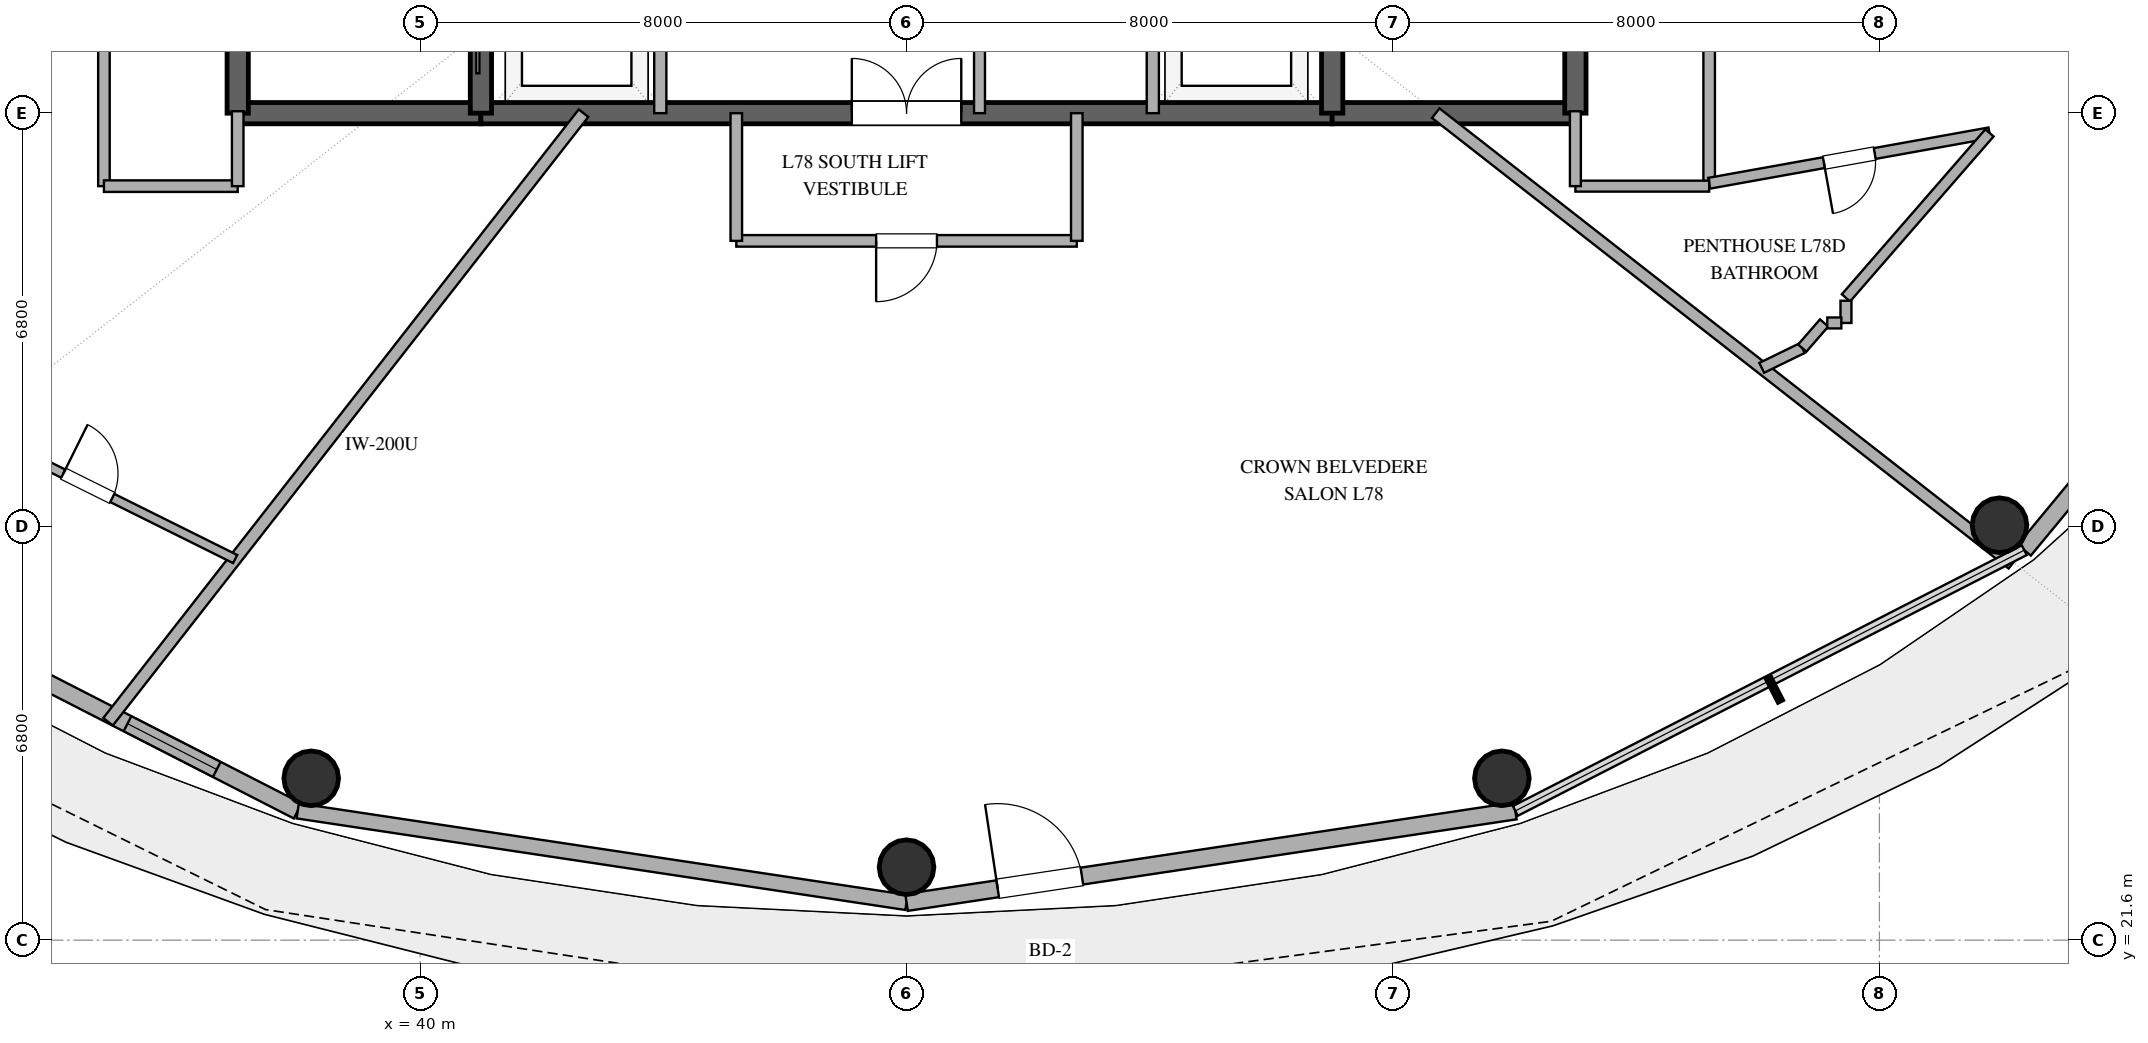
"""IFC4 building model, lengths in metres.
Left out: names, types, materials, properties, quantities, classifications, styles, units other than length and angle.
Written with IfcOpenShell. Run it as: python <this file> out.ifc"""

import sys

from ifc_helpers import new_model, si_unit, direction, frame, frame_2d, origin, origin_2d, place, context, subcontext, project, spatial, rectangle, hollow_circle, extrude, element, fill, save


model = new_model("IFC4")
c1 = context("Model", 3, precision=1e-05, world=origin(), true_north=direction((0.0, 1.0)))
c2 = subcontext(c1, "Body", "Model", "MODEL_VIEW")
j1 = project(units=[si_unit("LENGTHUNIT", "METRE"), si_unit("PLANEANGLEUNIT", "RADIAN")], contexts=[c1])
p1 = place(None, origin())
s1 = spatial("IfcSite", under=j1, at=p1, CompositionType="ELEMENT")
p2 = place(p1, origin())
s2 = spatial("IfcBuilding", under=s1, at=p2, CompositionType="ELEMENT")
p3 = place(p2, frame((0.0, 0.0, 301.8)))
s3 = spatial("IfcBuildingStorey", under=s2, at=p3, CompositionType="ELEMENT", Elevation=301.8)
p4 = place(p3, frame((37.0, 35.2, 0.0), z_axis=(0.0, 0.0, 1.0), x_axis=(1.0, 0.0, 0.0)))
e1 = element("IfcWall", 1, at=p4, inside=s3, PredefinedType="SHEAR", context=c2, shape_type="SweptSolid", body=[
    extrude(rectangle(XDim=4.0, YDim=0.35, at=frame_2d((2.0, 0.0))), origin(), (0.0, 0.0, 1.0), 3.37),
])
p5 = place(p3, frame((41.0, 35.2, 0.0), z_axis=(0.0, 0.0, 1.0), x_axis=(1.0, 0.0, 0.0)))
e2 = element("IfcWall", 2, at=p5, inside=s3, PredefinedType="SHEAR", context=c2, shape_type="SweptSolid", body=[
    extrude(rectangle(XDim=14.0, YDim=0.35, at=frame_2d((7.0, 0.0))), origin(), (0.0, 0.0, 1.0), 3.37),
])
p6 = place(p5, frame((6.1, 0.0, 0.0)))
e3 = element("IfcOpeningElement", 3, at=p6, cuts=e2, PredefinedType="OPENING", context=c2, shape_type="SweptSolid", body=[
    extrude(rectangle(XDim=1.8, YDim=2.25, at=frame_2d((0.9, 1.125))), frame((0.0, 0.185, 0.0), z_axis=(0.0, -1.0, 0.0), x_axis=(1.0, 0.0, 0.0)), (0.0, 0.0, 1.0), 0.37),
])
p7 = place(p3, frame((55.0, 35.2, 0.0), z_axis=(0.0, 0.0, 1.0), x_axis=(1.0, 0.0, 0.0)))
e4 = element("IfcWall", 4, at=p7, inside=s3, PredefinedType="SHEAR", context=c2, shape_type="SweptSolid", body=[
    extrude(rectangle(XDim=4.0, YDim=0.35, at=frame_2d((2.0, 0.0))), origin(), (0.0, 0.0, 1.0), 3.37),
])
p8 = place(p3, frame((37.0, 35.2, 0.0), z_axis=(0.0, 0.0, 1.0), x_axis=(0.0, 1.0, 0.0)))
e5 = element("IfcWall", 5, at=p8, inside=s3, PredefinedType="SHEAR", context=c2, shape_type="SweptSolid", body=[
    extrude(rectangle(XDim=13.6, YDim=0.35, at=frame_2d((6.8, 0.0))), origin(), (0.0, 0.0, 1.0), 3.37),
])
p9 = place(p8, frame((1.5, 0.0, 0.0)))
e6 = element("IfcOpeningElement", 6, at=p9, cuts=e5, PredefinedType="OPENING", context=c2, shape_type="SweptSolid", body=[
    extrude(rectangle(XDim=1.2, YDim=2.15, at=frame_2d((0.6, 1.075))), frame((0.0, 0.185, 0.0), z_axis=(0.0, -1.0, 0.0), x_axis=(1.0, 0.0, 0.0)), (0.0, 0.0, 1.0), 0.37),
])
p10 = place(p3, frame((59.0, 35.2, 0.0), z_axis=(0.0, 0.0, 1.0), x_axis=(0.0, 1.0, 0.0)))
e7 = element("IfcWall", 7, at=p10, inside=s3, PredefinedType="SHEAR", context=c2, shape_type="SweptSolid", body=[
    extrude(rectangle(XDim=13.6, YDim=0.35, at=frame_2d((6.8, 0.0))), origin(), (0.0, 0.0, 1.0), 3.37),
])
p11 = place(p10, frame((1.5, 0.0, 0.0)))
e8 = element("IfcOpeningElement", 8, at=p11, cuts=e7, PredefinedType="OPENING", context=c2, shape_type="SweptSolid", body=[
    extrude(rectangle(XDim=1.2, YDim=2.15, at=frame_2d((0.6, 1.075))), frame((0.0, 0.185, 0.0), z_axis=(0.0, -1.0, 0.0), x_axis=(1.0, 0.0, 0.0)), (0.0, 0.0, 1.0), 0.37),
])
p12 = place(p3, frame((41.0, 35.2, 0.0), z_axis=(0.0, 0.0, 1.0), x_axis=(0.0, 1.0, 0.0)))
e9 = element("IfcWall", 9, at=p12, inside=s3, PredefinedType="SHEAR", context=c2, shape_type="SweptSolid", body=[
    extrude(rectangle(XDim=13.6, YDim=0.35, at=frame_2d((6.8, 0.0))), origin(), (0.0, 0.0, 1.0), 3.37),
])
p13 = place(p12, frame((1.15, 0.0, 0.0)))
e10 = element("IfcOpeningElement", 10, at=p13, cuts=e9, PredefinedType="OPENING", context=c2, shape_type="SweptSolid", body=[
    extrude(rectangle(XDim=1.1, YDim=2.2, at=frame_2d((0.55, 1.1))), frame((0.0, 0.185, 0.0), z_axis=(0.0, -1.0, 0.0), x_axis=(1.0, 0.0, 0.0)), (0.0, 0.0, 1.0), 0.37),
])
p14 = place(p3, frame((55.0, 35.2, 0.0), z_axis=(0.0, 0.0, 1.0), x_axis=(0.0, 1.0, 0.0)))
e11 = element("IfcWall", 11, at=p14, inside=s3, PredefinedType="SHEAR", context=c2, shape_type="SweptSolid", body=[
    extrude(rectangle(XDim=13.6, YDim=0.35, at=frame_2d((6.8, 0.0))), origin(), (0.0, 0.0, 1.0), 3.37),
])
p15 = place(p14, frame((1.15, 0.0, 0.0)))
e12 = element("IfcOpeningElement", 12, at=p15, cuts=e11, PredefinedType="OPENING", context=c2, shape_type="SweptSolid", body=[
    extrude(rectangle(XDim=1.1, YDim=2.2, at=frame_2d((0.55, 1.1))), frame((0.0, 0.185, 0.0), z_axis=(0.0, -1.0, 0.0), x_axis=(1.0, 0.0, 0.0)), (0.0, 0.0, 1.0), 0.37),
])
for number, where, z_axis, x_axis in (
    (13, (38.209, 24.261, 0.0), (0.0, 0.0, 1.0), (1.0, 0.0, 0.0)),
    (14, (48.0, 22.8, 0.0), (0.0, 0.0, 1.0), (1.0, 0.0, 0.0)),
    (15, (57.791, 24.261, 0.0), (0.0, 0.0, 1.0), (1.0, 0.0, 0.0)),
    (16, (65.975, 28.424, 0.0), (0.0, 0.0, 1.0), (1.0, 0.0, 0.0)),
):
    element("IfcColumn", number, at=place(p3, frame(where, z_axis=z_axis, x_axis=x_axis)), inside=s3, PredefinedType="COLUMN", context=c2, shape_type="SweptSolid", body=[
        extrude(hollow_circle(Radius=0.45, WallThickness=0.025, at=origin_2d()), origin(), (0.0, 0.0, 1.0), 3.37),
    ])
p16 = place(p3, frame((29.617, 28.013, 0.0), z_axis=(0.0, 0.0, 1.0), x_axis=(0.890007394051, -0.455946091699, 0.0)))
e17 = element("IfcWall", 17, at=p16, inside=s3, PredefinedType="SOLIDWALL", context=c2, shape_type="SweptSolid", body=[
    extrude(rectangle(XDim=9.404, YDim=0.28, at=frame_2d((4.702, 0.0))), origin(), (0.0, 0.0, 1.0), 3.37),
])
p17 = place(p16, frame((2.742, 0.0, 0.85)))
e18 = element("IfcOpeningElement", 18, at=p17, cuts=e17, PredefinedType="OPENING", context=c2, shape_type="SweptSolid", body=[
    extrude(rectangle(XDim=1.8, YDim=2.2, at=frame_2d((0.9, 1.1))), frame((0.0, 0.15, 0.0), z_axis=(0.0, -1.0, 0.0), x_axis=(1.0, 0.0, 0.0)), (0.0, 0.0, 1.0), 0.3),
])
p18 = place(p16, frame((6.258, 0.0, 0.85)))
e19 = element("IfcOpeningElement", 19, at=p18, cuts=e17, PredefinedType="OPENING", context=c2, shape_type="SweptSolid", body=[
    extrude(rectangle(XDim=1.65, YDim=2.0, at=frame_2d((0.825, 1.0))), frame((0.0, 0.15, 0.0), z_axis=(0.0, -1.0, 0.0), x_axis=(1.0, 0.0, 0.0)), (0.0, 0.0, 1.0), 0.3),
])
p19 = place(p3, frame((37.987, 23.726, 0.0), z_axis=(0.0, 0.0, 1.0), x_axis=(0.988882522213, -0.148698881169, 0.0)))
e20 = element("IfcWall", 20, at=p19, inside=s3, PredefinedType="SOLIDWALL", context=c2, shape_type="SweptSolid", body=[
    extrude(rectangle(XDim=10.125, YDim=0.25, at=frame_2d((5.062, 0.0))), origin(), (0.0, 0.0, 1.0), 3.37),
])
p20 = place(p3, frame((48.0, 22.22, 0.0), z_axis=(0.0, 0.0, 1.0), x_axis=(0.988882522213, 0.148698881169, 0.0)))
e21 = element("IfcWall", 21, at=p20, inside=s3, PredefinedType="SOLIDWALL", context=c2, shape_type="SweptSolid", body=[
    extrude(rectangle(XDim=10.125, YDim=0.28, at=frame_2d((5.062, 0.0))), origin(), (0.0, 0.0, 1.0), 3.37),
])
p21 = place(p20, frame((1.516, 0.0, 0.0)))
e22 = element("IfcOpeningElement", 22, at=p21, cuts=e21, PredefinedType="OPENING", context=c2, shape_type="SweptSolid", body=[
    extrude(rectangle(XDim=1.4, YDim=2.2, at=frame_2d((0.7, 1.1))), frame((0.0, 0.15, 0.0), z_axis=(0.0, -1.0, 0.0), x_axis=(1.0, 0.0, 0.0)), (0.0, 0.0, 1.0), 0.3),
])
p22 = place(p3, frame((66.383, 28.013, 0.0), z_axis=(0.0, 0.0, 1.0), x_axis=(0.63761509934, 0.770355103243, 0.0)))
e23 = element("IfcWall", 23, at=p22, inside=s3, PredefinedType="SOLIDWALL", context=c2, shape_type="SweptSolid", body=[
    extrude(rectangle(XDim=8.33, YDim=0.28, at=frame_2d((4.165, 0.0))), origin(), (0.0, 0.0, 1.0), 3.37),
])
p23 = place(p22, frame((2.326, 0.0, 0.85)))
e24 = element("IfcOpeningElement", 24, at=p23, cuts=e23, PredefinedType="OPENING", context=c2, shape_type="SweptSolid", body=[
    extrude(rectangle(XDim=1.35, YDim=1.8, at=frame_2d((0.675, 0.9))), frame((0.0, 0.15, 0.0), z_axis=(0.0, -1.0, 0.0), x_axis=(1.0, 0.0, 0.0)), (0.0, 0.0, 1.0), 0.3),
])
p24 = place(p22, frame((4.546, 0.0, 0.85)))
e25 = element("IfcOpeningElement", 25, at=p24, cuts=e23, PredefinedType="OPENING", context=c2, shape_type="SweptSolid", body=[
    extrude(rectangle(XDim=1.35, YDim=1.8, at=frame_2d((0.675, 0.9))), frame((0.0, 0.15, 0.0), z_axis=(0.0, -1.0, 0.0), x_axis=(1.0, 0.0, 0.0)), (0.0, 0.0, 1.0), 0.3),
])
for number, where, z_axis, x_axis in (
    (26, (43.95, 35.2, 0.0), (0.0, 0.0, 1.0), (0.0, 1.0, 0.0)),
    (27, (52.05, 35.2, 0.0), (0.0, 0.0, 1.0), (0.0, 1.0, 0.0)),
):
    element("IfcWall", number, at=place(p3, frame(where, z_axis=z_axis, x_axis=x_axis)), inside=s3, PredefinedType="SOLIDWALL", context=c2, shape_type="SweptSolid", body=[
        extrude(rectangle(XDim=3.2, YDim=0.2, at=frame_2d((1.6, 0.0))), origin(), (0.0, 0.0, 1.0), 2.73),
    ])
p25 = place(p3, frame((49.2, 35.2, 0.0), z_axis=(0.0, 0.0, 1.0), x_axis=(0.0, 1.0, 0.0)))
e28 = element("IfcWall", 28, at=p25, inside=s3, PredefinedType="PLUMBINGWALL", context=c2, shape_type="SweptSolid", body=[
    extrude(rectangle(XDim=3.2, YDim=0.18, at=frame_2d((1.6, 0.0))), origin(), (0.0, 0.0, 1.0), 2.73),
])
p26 = place(p25, frame((1.15, 0.0, 0.0)))
e29 = element("IfcOpeningElement", 29, at=p26, cuts=e28, PredefinedType="OPENING", context=c2, shape_type="SweptSolid", body=[
    extrude(rectangle(XDim=0.9, YDim=2.1, at=frame_2d((0.45, 1.05))), frame((0.0, 0.1, 0.0), z_axis=(0.0, -1.0, 0.0), x_axis=(1.0, 0.0, 0.0)), (0.0, 0.0, 1.0), 0.2),
])
p27 = place(p3, frame((61.2, 50.9, 0.0), z_axis=(0.0, 0.0, 1.0), x_axis=(0.0, -1.0, 0.0)))
e30 = element("IfcWall", 30, at=p27, inside=s3, PredefinedType="PARTITIONING", context=c2, shape_type="SweptSolid", body=[
    extrude(rectangle(XDim=16.885, YDim=0.19, at=frame_2d((8.442, 0.0))), origin(), (0.0, 0.0, 1.0), 2.73),
])
p28 = place(p27, frame((7.942, 0.0, 0.0)))
e31 = element("IfcOpeningElement", 31, at=p28, cuts=e30, PredefinedType="OPENING", context=c2, shape_type="SweptSolid", body=[
    extrude(rectangle(XDim=1.0, YDim=2.2, at=frame_2d((0.5, 1.1))), frame((0.0, 0.105, 0.0), z_axis=(0.0, -1.0, 0.0), x_axis=(1.0, 0.0, 0.0)), (0.0, 0.0, 1.0), 0.21),
])
p29 = place(p3, frame((42.687, 35.2, 0.0), z_axis=(0.0, 0.0, 1.0), x_axis=(-0.615663811723, -0.788008928208, 0.0)))
e32 = element("IfcWall", 32, at=p29, inside=s3, PredefinedType="PARTITIONING", context=c2, shape_type="SweptSolid", body=[
    extrude(rectangle(XDim=12.701, YDim=0.2, at=frame_2d((6.351, 0.0))), origin(), (0.0, 0.0, 1.0), 2.73),
])
p30 = place(p3, frame((56.704, 35.2, 0.0), z_axis=(0.0, 0.0, 1.0), x_axis=(0.78802314347, -0.615645616695, 0.0)))
e33 = element("IfcWall", 33, at=p30, inside=s3, PredefinedType="PARTITIONING", context=c2, shape_type="SweptSolid", body=[
    extrude(rectangle(XDim=12.034, YDim=0.2, at=frame_2d((6.017, 0.0))), origin(), (0.0, 0.0, 1.0), 2.73),
])
p31 = place(p3, frame((50.8, 33.1, 0.0), z_axis=(0.0, 0.0, 1.0), x_axis=(-1.0, 0.0, 0.0)))
e34 = element("IfcWall", 34, at=p31, inside=s3, PredefinedType="PARTITIONING", context=c2, shape_type="SweptSolid", body=[
    extrude(rectangle(XDim=5.6, YDim=0.19, at=frame_2d((2.8, 0.0))), origin(), (0.0, 0.0, 1.0), 2.73),
])
p32 = place(p31, frame((2.3, 0.0, 0.0)))
e35 = element("IfcOpeningElement", 35, at=p32, cuts=e34, PredefinedType="OPENING", context=c2, shape_type="SweptSolid", body=[
    extrude(rectangle(XDim=1.0, YDim=2.2, at=frame_2d((0.5, 1.1))), frame((0.0, 0.105, 0.0), z_axis=(0.0, -1.0, 0.0), x_axis=(1.0, 0.0, 0.0)), (0.0, 0.0, 1.0), 0.21),
])
p33 = place(p3, frame((32.11, 30.276, 0.0), z_axis=(0.0, 0.0, 1.0), x_axis=(0.895587674753, -0.444885060247, 0.0)))
e36 = element("IfcWall", 36, at=p33, inside=s3, PredefinedType="PARTITIONING", context=c2, shape_type="SweptSolid", body=[
    extrude(rectangle(XDim=5.414, YDim=0.15, at=frame_2d((2.707, 0.0))), origin(), (0.0, 0.0, 1.0), 2.73),
])
p34 = place(p33, frame((2.257, 0.0, 0.0)))
e37 = element("IfcOpeningElement", 37, at=p34, cuts=e36, PredefinedType="OPENING", context=c2, shape_type="SweptSolid", body=[
    extrude(rectangle(XDim=0.9, YDim=2.1, at=frame_2d((0.45, 1.05))), frame((0.0, 0.085, 0.0), z_axis=(0.0, -1.0, 0.0), x_axis=(1.0, 0.0, 0.0)), (0.0, 0.0, 1.0), 0.17),
])
p35 = place(p3, frame((65.81, 34.875, 0.0), z_axis=(0.0, 0.0, 1.0), x_axis=(-0.984255399889, -0.1767521083, 0.0)))
e38 = element("IfcWall", 38, at=p35, inside=s3, PredefinedType="PLUMBINGWALL", context=c2, shape_type="SweptSolid", body=[
    extrude(rectangle(XDim=4.684, YDim=0.18, at=frame_2d((2.342, 0.0))), origin(), (0.0, 0.0, 1.0), 2.73),
])
p36 = place(p35, frame((1.917, 0.0, 0.0)))
e39 = element("IfcOpeningElement", 39, at=p36, cuts=e38, PredefinedType="OPENING", context=c2, shape_type="SweptSolid", body=[
    extrude(rectangle(XDim=0.85, YDim=2.1, at=frame_2d((0.425, 1.05))), frame((0.0, 0.1, 0.0), z_axis=(0.0, -1.0, 0.0), x_axis=(1.0, 0.0, 0.0)), (0.0, 0.0, 1.0), 0.2),
])
p37 = place(p3, frame((34.8, 34.0, 0.0), z_axis=(0.0, 0.0, 1.0), x_axis=(0.0, 1.0, 0.0)))
e40 = element("IfcWall", 40, at=p37, inside=s3, PredefinedType="PARTITIONING", context=c2, shape_type="SweptSolid", body=[
    extrude(rectangle(XDim=3.728, YDim=0.19, at=frame_2d((1.864, 0.0))), origin(), (0.0, 0.0, 1.0), 2.73),
])
p38 = place(p3, frame((63.45, 32.163, 0.0), z_axis=(0.0, 0.0, 1.0), x_axis=(0.656415720833, 0.754399364689, 0.0)))
e41 = element("IfcWall", 41, at=p38, inside=s3, PredefinedType="PLUMBINGWALL", context=c2, shape_type="SweptSolid", body=[
    extrude(rectangle(XDim=3.595, YDim=0.18, at=frame_2d((1.798, 0.0))), origin(), (0.0, 0.0, 1.0), 2.73),
])
p39 = place(p3, frame((37.0, 34.0, 0.0), z_axis=(0.0, 0.0, 1.0), x_axis=(-1.0, 0.0, 0.0)))
e42 = element("IfcWall", 42, at=p39, inside=s3, PredefinedType="PARTITIONING", context=c2, shape_type="SweptSolid", body=[
    extrude(rectangle(XDim=2.2, YDim=0.19, at=frame_2d((1.1, 0.0))), origin(), (0.0, 0.0, 1.0), 2.73),
])
p40 = place(p3, frame((61.2, 34.0, 0.0), z_axis=(0.0, 0.0, 1.0), x_axis=(-1.0, 0.0, 0.0)))
e43 = element("IfcWall", 43, at=p40, inside=s3, PredefinedType="PLUMBINGWALL", context=c2, shape_type="SweptSolid", body=[
    extrude(rectangle(XDim=2.2, YDim=0.18, at=frame_2d((1.1, 0.0))), origin(), (0.0, 0.0, 1.0), 2.73),
])
for number, where, z_axis, x_axis in (
    (44, (50.8, 35.2, 0.0), (0.0, 0.0, 1.0), (0.0, -1.0, 0.0)),
    (45, (45.2, 33.1, 0.0), (0.0, 0.0, 1.0), (0.0, 1.0, 0.0)),
):
    element("IfcWall", number, at=place(p3, frame(where, z_axis=z_axis, x_axis=x_axis)), inside=s3, PredefinedType="PARTITIONING", context=c2, shape_type="SweptSolid", body=[
        extrude(rectangle(XDim=2.1, YDim=0.19, at=frame_2d((1.05, 0.0))), origin(), (0.0, 0.0, 1.0), 2.73),
    ])
p41 = place(p3, frame((37.0, 35.232, 0.0), z_axis=(0.0, 0.0, 1.0), x_axis=(0.0, -1.0, 0.0)))
e46 = element("IfcWall", 46, at=p41, inside=s3, PredefinedType="PARTITIONING", context=c2, shape_type="SweptSolid", body=[
    extrude(rectangle(XDim=1.232, YDim=0.19, at=frame_2d((0.616, 0.0))), origin(), (0.0, 0.0, 1.0), 2.73),
])
p42 = place(p3, frame((59.0, 34.0, 0.0), z_axis=(0.0, 0.0, 1.0), x_axis=(0.0, 1.0, 0.0)))
e47 = element("IfcWall", 47, at=p42, inside=s3, PredefinedType="PLUMBINGWALL", context=c2, shape_type="SweptSolid", body=[
    extrude(rectangle(XDim=1.232, YDim=0.18, at=frame_2d((0.616, 0.0))), origin(), (0.0, 0.0, 1.0), 2.73),
])
p43 = place(p3, frame((62.064, 31.012, 0.0), z_axis=(0.0, 0.0, 1.0), x_axis=(0.898856964529, 0.438242121798, 0.0)))
e48 = element("IfcWall", 48, at=p43, inside=s3, PredefinedType="PLUMBINGWALL", context=c2, shape_type="SweptSolid", body=[
    extrude(rectangle(XDim=0.742, YDim=0.18, at=frame_2d((0.371, 0.0))), origin(), (0.0, 0.0, 1.0), 2.73),
])
p44 = place(p3, frame((62.731, 31.337, 0.0), z_axis=(0.0, 0.0, 1.0), x_axis=(0.656609016673, 0.754231131168, 0.0)))
e49 = element("IfcWall", 49, at=p44, inside=s3, PredefinedType="PLUMBINGWALL", context=c2, shape_type="SweptSolid", body=[
    extrude(rectangle(XDim=0.548, YDim=0.18, at=frame_2d((0.274, 0.0))), origin(), (0.0, 0.0, 1.0), 2.73),
])
p45 = place(p3, frame((63.45, 31.75, 0.0), z_axis=(0.0, 0.0, 1.0), x_axis=(0.0, 1.0, 0.0)))
e50 = element("IfcWall", 50, at=p45, inside=s3, PredefinedType="PLUMBINGWALL", context=c2, shape_type="SweptSolid", body=[
    extrude(rectangle(XDim=0.365, YDim=0.18, at=frame_2d((0.183, 0.0))), origin(), (0.0, 0.0, 1.0), 2.73),
])
p46 = place(p3, frame((63.143, 31.75, 0.0), z_axis=(0.0, 0.0, 1.0), x_axis=(1.0, 0.0, 0.0)))
e51 = element("IfcWall", 51, at=p46, inside=s3, PredefinedType="PLUMBINGWALL", context=c2, shape_type="SweptSolid", body=[
    extrude(rectangle(XDim=0.231, YDim=0.18, at=frame_2d((0.116, 0.0))), origin(), (0.0, 0.0, 1.0), 2.73),
])
p47 = place(p18, origin())
e52 = element("IfcWindow", 52, at=p47, inside=s3, PartitioningType="SINGLE_PANEL", PredefinedType="WINDOW", context=c2, shape_type="SweptSolid", body=[
    extrude(rectangle(XDim=1.65, YDim=2.0, at=frame_2d((0.825, 1.0))), frame((0.0, 0.03, 0.0), z_axis=(0.0, -1.0, 0.0), x_axis=(1.0, 0.0, 0.0)), (0.0, 0.0, 1.0), 0.06),
])
fill(e19, e52)
p48 = place(p21, origin())
e53 = element("IfcDoor", 53, at=p48, inside=s3, OperationType="SINGLE_SWING_LEFT", PredefinedType="DOOR", context=c2, shape_type="SweptSolid", body=[
    extrude(rectangle(XDim=1.4, YDim=2.2, at=frame_2d((0.7, 1.1))), frame((0.0, 0.025, 0.0), z_axis=(0.0, -1.0, 0.0), x_axis=(1.0, 0.0, 0.0)), (0.0, 0.0, 1.0), 0.05),
])
fill(e22, e53)
p49 = place(p6, origin())
e54 = element("IfcDoor", 54, at=p49, inside=s3, OperationType="DOUBLE_DOOR_SINGLE_SWING", PredefinedType="DOOR", context=c2, shape_type="SweptSolid", body=[
    extrude(rectangle(XDim=1.8, YDim=2.25, at=frame_2d((0.9, 1.125))), frame((0.0, 0.025, 0.0), z_axis=(0.0, -1.0, 0.0), x_axis=(1.0, 0.0, 0.0)), (0.0, 0.0, 1.0), 0.05),
])
fill(e3, e54)
p50 = place(p32, origin())
e55 = element("IfcDoor", 55, at=p50, inside=s3, OperationType="SINGLE_SWING_RIGHT", PredefinedType="DOOR", context=c2, shape_type="SweptSolid", body=[
    extrude(rectangle(XDim=1.0, YDim=2.2, at=frame_2d((0.5, 1.1))), frame((0.0, 0.025, 0.0), z_axis=(0.0, -1.0, 0.0), x_axis=(1.0, 0.0, 0.0)), (0.0, 0.0, 1.0), 0.05),
])
fill(e35, e55)
p51 = place(p34, origin())
e56 = element("IfcDoor", 56, at=p51, inside=s3, OperationType="SINGLE_SWING_LEFT", PredefinedType="DOOR", context=c2, shape_type="SweptSolid", body=[
    extrude(rectangle(XDim=0.9, YDim=2.1, at=frame_2d((0.45, 1.05))), frame((0.0, 0.025, 0.0), z_axis=(0.0, -1.0, 0.0), x_axis=(1.0, 0.0, 0.0)), (0.0, 0.0, 1.0), 0.05),
])
fill(e37, e56)
p52 = place(p36, origin())
e57 = element("IfcDoor", 57, at=p52, inside=s3, OperationType="SINGLE_SWING_RIGHT", PredefinedType="DOOR", context=c2, shape_type="SweptSolid", body=[
    extrude(rectangle(XDim=0.85, YDim=2.1, at=frame_2d((0.425, 1.05))), frame((0.0, 0.025, 0.0), z_axis=(0.0, -1.0, 0.0), x_axis=(1.0, 0.0, 0.0)), (0.0, 0.0, 1.0), 0.05),
])
fill(e39, e57)
save(model, sys.argv[1])
